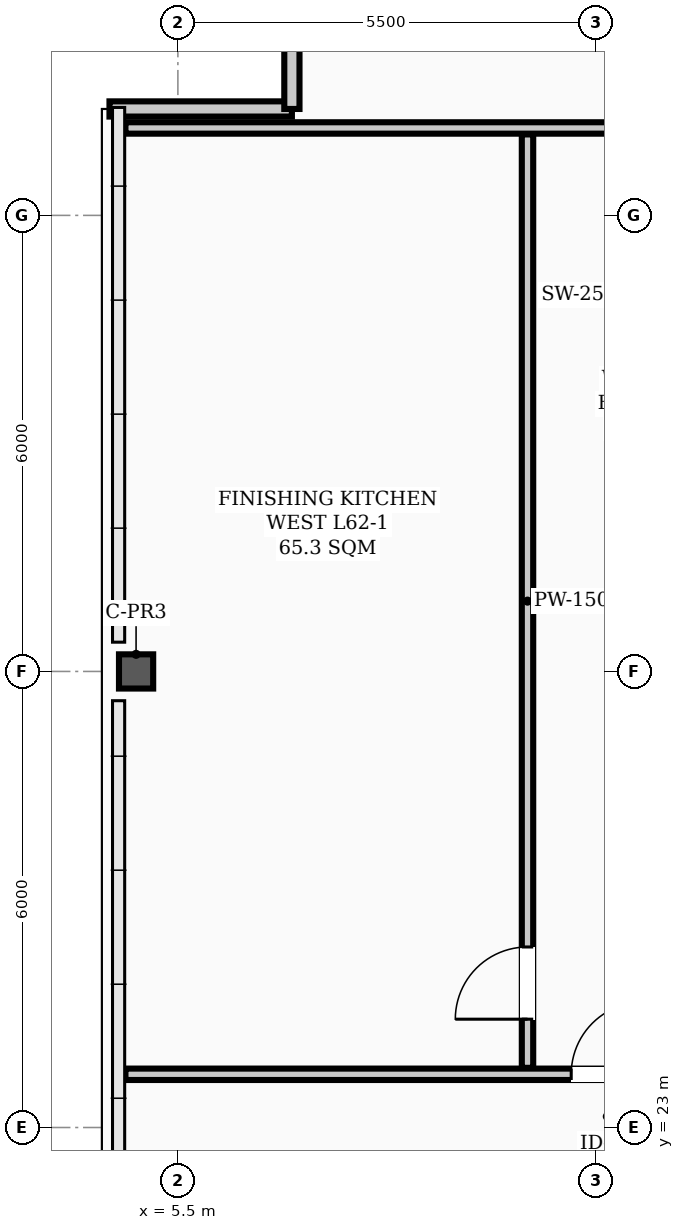
"""IFC4 building model, lengths in metres.
Left out: names, types, materials, properties, quantities, classifications, styles, units other than length and angle.
Written with IfcOpenShell. Run it as: python <this file> out.ifc"""

import sys

from ifc_helpers import new_model, si_unit, direction, frame, frame_2d, origin, origin_2d, place, context, subcontext, project, spatial, rectangle, hollow_rectangle, extrude, element, fill, save


model = new_model("IFC4")
c1 = context("Model", 3, precision=1e-05, world=origin(), true_north=direction((0.0, 1.0)))
c2 = subcontext(c1, "Body", "Model", "MODEL_VIEW")
j1 = project(units=[si_unit("LENGTHUNIT", "METRE"), si_unit("PLANEANGLEUNIT", "RADIAN")], contexts=[c1])
p1 = place(None, origin())
s1 = spatial("IfcSite", under=j1, at=p1, CompositionType="ELEMENT")
p2 = place(p1, origin())
s2 = spatial("IfcBuilding", under=s1, at=p2, CompositionType="ELEMENT")
p3 = place(p2, frame((0.0, 0.0, 250.1)))
s3 = spatial("IfcBuildingStorey", under=s2, at=p3, CompositionType="ELEMENT", Elevation=250.1)
p4 = place(p3, frame((4.95, 29.0, 0.0), z_axis=(0.0, 0.0, 1.0), x_axis=(1.0, 0.0, 0.0)))
e1 = element("IfcColumn", 1, at=p4, inside=s3, PredefinedType="COLUMN", context=c2, shape_type="SweptSolid", body=[
    extrude(hollow_rectangle(XDim=0.45, YDim=0.45, WallThickness=0.022, InnerFilletRadius=0.022, OuterFilletRadius=0.044, at=origin_2d()), origin(), (0.0, 0.0, 1.0), 3.9),
])
p5 = place(p3, frame((4.6, 36.4, 0.0), z_axis=(0.0, 0.0, 1.0), x_axis=(1.0, 0.0, 0.0)))
e2 = element("IfcWall", 2, at=p5, inside=s3, PredefinedType="PARAPET", context=c2, shape_type="SweptSolid", body=[
    extrude(rectangle(XDim=2.4, YDim=0.2, at=frame_2d((1.2, 0.0))), origin(), (0.0, 0.0, 1.0), 1.2),
])
p6 = place(p3, frame((7.0, 36.4, 0.0), z_axis=(0.0, 0.0, 1.0), x_axis=(0.0, 1.0, 0.0)))
e3 = element("IfcWall", 3, at=p6, inside=s3, PredefinedType="PARAPET", context=c2, shape_type="SweptSolid", body=[
    extrude(rectangle(XDim=2.4, YDim=0.2, at=frame_2d((1.2, 0.0))), origin(), (0.0, 0.0, 1.0), 1.2),
])
p7 = place(p3, frame((4.81, 23.7, 0.0), z_axis=(0.0, 0.0, 1.0), x_axis=(1.0, 0.0, 0.0)))
e4 = element("IfcWall", 4, at=p7, inside=s3, PredefinedType="PARTITIONING", context=c2, shape_type="SweptSolid", body=[
    extrude(rectangle(XDim=40.88, YDim=0.15, at=frame_2d((20.44, 0.0))), origin(), (0.0, 0.0, 1.0), 3.2),
])
p8 = place(p7, frame((5.865, 0.0, 0.0)))
e5 = element("IfcOpeningElement", 5, at=p8, cuts=e4, PredefinedType="OPENING", context=c2, shape_type="SweptSolid", body=[
    extrude(rectangle(XDim=0.95, YDim=2.08, at=frame_2d((0.475, 1.04))), frame((0.0, 0.085, 0.0), z_axis=(0.0, -1.0, 0.0), x_axis=(1.0, 0.0, 0.0)), (0.0, 0.0, 1.0), 0.17),
])
p9 = place(p7, frame((13.115, 0.0, 0.0)))
e6 = element("IfcOpeningElement", 6, at=p9, cuts=e4, PredefinedType="OPENING", context=c2, shape_type="SweptSolid", body=[
    extrude(rectangle(XDim=0.95, YDim=2.08, at=frame_2d((0.475, 1.04))), frame((0.0, 0.085, 0.0), z_axis=(0.0, -1.0, 0.0), x_axis=(1.0, 0.0, 0.0)), (0.0, 0.0, 1.0), 0.17),
])
p10 = place(p7, frame((16.515, 0.0, 0.0)))
e7 = element("IfcOpeningElement", 7, at=p10, cuts=e4, PredefinedType="OPENING", context=c2, shape_type="SweptSolid", body=[
    extrude(rectangle(XDim=0.95, YDim=2.08, at=frame_2d((0.475, 1.04))), frame((0.0, 0.085, 0.0), z_axis=(0.0, -1.0, 0.0), x_axis=(1.0, 0.0, 0.0)), (0.0, 0.0, 1.0), 0.17),
])
p11 = place(p7, frame((22.915, 0.0, 0.0)))
e8 = element("IfcOpeningElement", 8, at=p11, cuts=e4, PredefinedType="OPENING", context=c2, shape_type="SweptSolid", body=[
    extrude(rectangle(XDim=0.95, YDim=2.08, at=frame_2d((0.475, 1.04))), frame((0.0, 0.085, 0.0), z_axis=(0.0, -1.0, 0.0), x_axis=(1.0, 0.0, 0.0)), (0.0, 0.0, 1.0), 0.17),
])
p12 = place(p7, frame((29.115, 0.0, 0.0)))
e9 = element("IfcOpeningElement", 9, at=p12, cuts=e4, PredefinedType="OPENING", context=c2, shape_type="SweptSolid", body=[
    extrude(rectangle(XDim=0.95, YDim=2.08, at=frame_2d((0.475, 1.04))), frame((0.0, 0.085, 0.0), z_axis=(0.0, -1.0, 0.0), x_axis=(1.0, 0.0, 0.0)), (0.0, 0.0, 1.0), 0.17),
])
p13 = place(p7, frame((34.215, 0.0, 0.0)))
e10 = element("IfcOpeningElement", 10, at=p13, cuts=e4, PredefinedType="OPENING", context=c2, shape_type="SweptSolid", body=[
    extrude(rectangle(XDim=0.95, YDim=2.08, at=frame_2d((0.475, 1.04))), frame((0.0, 0.085, 0.0), z_axis=(0.0, -1.0, 0.0), x_axis=(1.0, 0.0, 0.0)), (0.0, 0.0, 1.0), 0.17),
])
p14 = place(p7, frame((38.46, 0.0, 0.0)))
e11 = element("IfcOpeningElement", 11, at=p14, cuts=e4, PredefinedType="OPENING", context=c2, shape_type="SweptSolid", body=[
    extrude(rectangle(XDim=0.95, YDim=2.08, at=frame_2d((0.475, 1.04))), frame((0.0, 0.085, 0.0), z_axis=(0.0, -1.0, 0.0), x_axis=(1.0, 0.0, 0.0)), (0.0, 0.0, 1.0), 0.17),
])
p15 = place(p3, frame((4.81, 36.15, 0.0), z_axis=(0.0, 0.0, 1.0), x_axis=(1.0, 0.0, 0.0)))
e12 = element("IfcWall", 12, at=p15, inside=s3, PredefinedType="PARTITIONING", context=c2, shape_type="SweptSolid", body=[
    extrude(rectangle(XDim=8.455, YDim=0.15, at=frame_2d((4.228, 0.0))), origin(), (0.0, 0.0, 1.0), 3.2),
])
p16 = place(p3, frame((10.1, 23.785, 0.0), z_axis=(0.0, 0.0, 1.0), x_axis=(0.0, 1.0, 0.0)))
e13 = element("IfcWall", 13, at=p16, inside=s3, PredefinedType="PARTITIONING", context=c2, shape_type="SweptSolid", body=[
    extrude(rectangle(XDim=12.28, YDim=0.15, at=frame_2d((6.14, 0.0))), origin(), (0.0, 0.0, 1.0), 3.1),
])
p17 = place(p16, frame((0.64, 0.0, 0.0)))
e14 = element("IfcOpeningElement", 14, at=p17, cuts=e13, PredefinedType="OPENING", context=c2, shape_type="SweptSolid", body=[
    extrude(rectangle(XDim=0.95, YDim=2.08, at=frame_2d((0.475, 1.04))), frame((0.0, 0.085, 0.0), z_axis=(0.0, -1.0, 0.0), x_axis=(1.0, 0.0, 0.0)), (0.0, 0.0, 1.0), 0.17),
])
p18 = place(p8, origin())
e15 = element("IfcDoor", 15, at=p18, inside=s3, OperationType="SINGLE_SWING_RIGHT", PredefinedType="DOOR", context=c2, shape_type="SweptSolid", body=[
    extrude(rectangle(XDim=0.95, YDim=2.08, at=frame_2d((0.475, 1.04))), frame((0.0, 0.025, 0.0), z_axis=(0.0, -1.0, 0.0), x_axis=(1.0, 0.0, 0.0)), (0.0, 0.0, 1.0), 0.05),
])
fill(e5, e15)
p19 = place(p17, origin())
e16 = element("IfcDoor", 16, at=p19, inside=s3, OperationType="SINGLE_SWING_LEFT", PredefinedType="DOOR", context=c2, shape_type="SweptSolid", body=[
    extrude(rectangle(XDim=0.95, YDim=2.08, at=frame_2d((0.475, 1.04))), frame((0.0, 0.025, 0.0), z_axis=(0.0, -1.0, 0.0), x_axis=(1.0, 0.0, 0.0)), (0.0, 0.0, 1.0), 0.05),
])
fill(e14, e16)
save(model, sys.argv[1])
